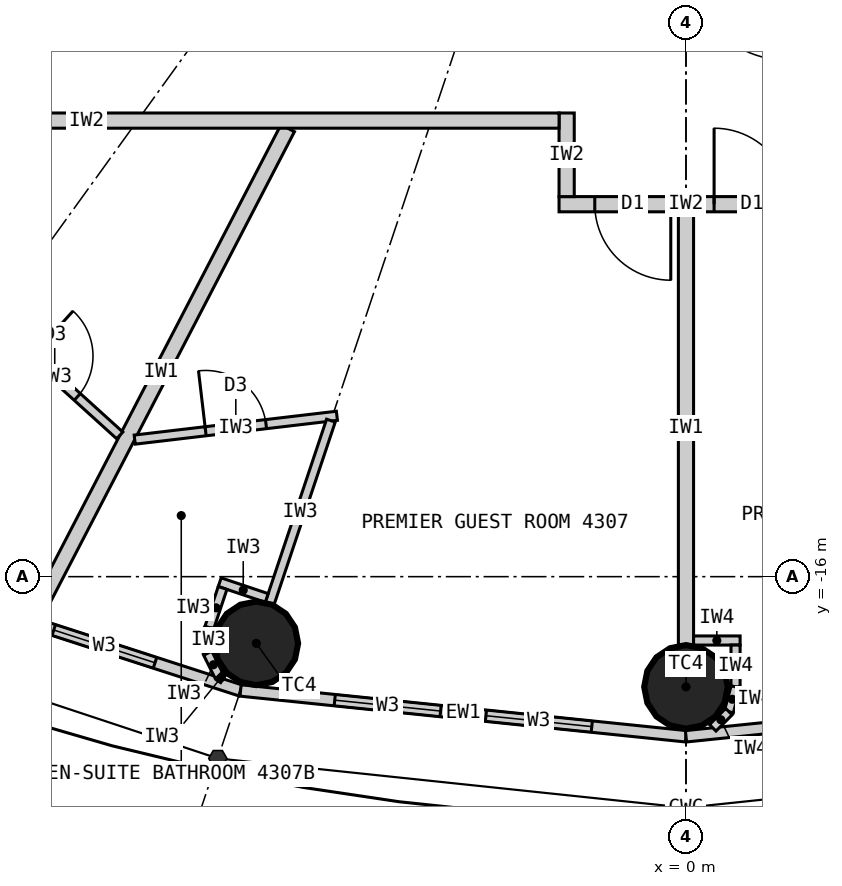
"""IFC4 building model, lengths in metres.
Left out: names, types, materials, properties, quantities, classifications, styles, units other than length and angle.
Written with IfcOpenShell. Run it as: python <this file> out.ifc"""

import sys

from ifc_helpers import new_model, si_unit, direction, frame, frame_2d, origin, origin_2d, place, context, subcontext, project, spatial, rectangle, circle, extrude, element, fill, save


model = new_model("IFC4")
c1 = context("Model", 3, precision=1e-05, world=origin(), true_north=direction((0.0, 1.0)))
c2 = subcontext(c1, "Body", "Model", "MODEL_VIEW")
j1 = project(units=[si_unit("LENGTHUNIT", "METRE"), si_unit("PLANEANGLEUNIT", "RADIAN")], contexts=[c1])
p1 = place(None, origin())
s1 = spatial("IfcSite", under=j1, at=p1, CompositionType="ELEMENT")
p2 = place(p1, origin())
s2 = spatial("IfcBuilding", under=s1, at=p2, CompositionType="ELEMENT")
p3 = place(p2, frame((0.0, 0.0, 163.2)))
s3 = spatial("IfcBuildingStorey", under=s2, at=p3, CompositionType="ELEMENT", Elevation=163.2)
for number, where, z_axis, x_axis in (
    (1, (-5.653, -16.877, 0.0), (0.0, 0.0, 1.0), (1.0, 0.0, 0.0)),
    (2, (0.0, -17.45, 0.0), (0.0, 0.0, 1.0), (1.0, 0.0, 0.0)),
):
    element("IfcColumn", number, at=place(p3, frame(where, z_axis=z_axis, x_axis=x_axis)), inside=s3, PredefinedType="COLUMN", context=c2, shape_type="SweptSolid", body=[
        extrude(circle(Radius=0.55, at=origin_2d()), origin(), (0.0, 0.0, 1.0), 3.3),
    ])
p4 = place(p3, frame((-11.346, -15.722, 0.0), z_axis=(0.0, 0.0, 1.0), x_axis=(0.951432482129, -0.307857486429, 0.0)))
e3 = element("IfcWall", 3, at=p4, inside=s3, PredefinedType="ELEMENTEDWALL", context=c2, shape_type="SweptSolid", body=[
    extrude(rectangle(XDim=5.766, YDim=0.15, at=frame_2d((2.883, 0.0))), origin(), (0.0, 0.0, 1.0), 3.12),
])
p5 = place(p4, frame((1.183, 0.0, 0.9)))
e4 = element("IfcOpeningElement", 4, at=p5, cuts=e3, PredefinedType="OPENING", context=c2, shape_type="SweptSolid", body=[
    extrude(rectangle(XDim=1.4, YDim=1.9, at=frame_2d((0.7, 0.95))), frame((0.0, 0.085, 0.0), z_axis=(0.0, -1.0, 0.0), x_axis=(1.0, 0.0, 0.0)), (0.0, 0.0, 1.0), 0.17),
])
p6 = place(p4, frame((3.183, 0.0, 0.9)))
e5 = element("IfcOpeningElement", 5, at=p6, cuts=e3, PredefinedType="OPENING", context=c2, shape_type="SweptSolid", body=[
    extrude(rectangle(XDim=1.4, YDim=1.9, at=frame_2d((0.7, 0.95))), frame((0.0, 0.085, 0.0), z_axis=(0.0, -1.0, 0.0), x_axis=(1.0, 0.0, 0.0)), (0.0, 0.0, 1.0), 0.17),
])
p7 = place(p3, frame((-5.86, -17.497, 0.0), z_axis=(0.0, 0.0, 1.0), x_axis=(0.994751738032, -0.102318032045, 0.0)))
e6 = element("IfcWall", 6, at=p7, inside=s3, PredefinedType="ELEMENTEDWALL", context=c2, shape_type="SweptSolid", body=[
    extrude(rectangle(XDim=5.891, YDim=0.15, at=frame_2d((2.946, 0.0))), origin(), (0.0, 0.0, 1.0), 3.12),
])
p8 = place(p7, frame((1.246, 0.0, 0.9)))
e7 = element("IfcOpeningElement", 7, at=p8, cuts=e6, PredefinedType="OPENING", context=c2, shape_type="SweptSolid", body=[
    extrude(rectangle(XDim=1.4, YDim=1.9, at=frame_2d((0.7, 0.95))), frame((0.0, 0.085, 0.0), z_axis=(0.0, -1.0, 0.0), x_axis=(1.0, 0.0, 0.0)), (0.0, 0.0, 1.0), 0.17),
])
p9 = place(p7, frame((3.246, 0.0, 0.9)))
e8 = element("IfcOpeningElement", 8, at=p9, cuts=e6, PredefinedType="OPENING", context=c2, shape_type="SweptSolid", body=[
    extrude(rectangle(XDim=1.4, YDim=1.9, at=frame_2d((0.7, 0.95))), frame((0.0, 0.085, 0.0), z_axis=(0.0, -1.0, 0.0), x_axis=(1.0, 0.0, 0.0)), (0.0, 0.0, 1.0), 0.17),
])
p10 = place(p3, frame((0.0, -18.1, 0.0), z_axis=(0.0, 0.0, 1.0), x_axis=(0.994751738032, 0.102318032045, 0.0)))
e9 = element("IfcWall", 9, at=p10, inside=s3, PredefinedType="ELEMENTEDWALL", context=c2, shape_type="SweptSolid", body=[
    extrude(rectangle(XDim=5.891, YDim=0.15, at=frame_2d((2.946, 0.0))), origin(), (0.0, 0.0, 1.0), 3.12),
])
p11 = place(p10, frame((1.246, 0.0, 0.9)))
e10 = element("IfcOpeningElement", 10, at=p11, cuts=e9, PredefinedType="OPENING", context=c2, shape_type="SweptSolid", body=[
    extrude(rectangle(XDim=1.4, YDim=1.9, at=frame_2d((0.7, 0.95))), frame((0.0, 0.085, 0.0), z_axis=(0.0, -1.0, 0.0), x_axis=(1.0, 0.0, 0.0)), (0.0, 0.0, 1.0), 0.17),
])
p12 = place(p10, frame((3.246, 0.0, 0.9)))
e11 = element("IfcOpeningElement", 11, at=p12, cuts=e9, PredefinedType="OPENING", context=c2, shape_type="SweptSolid", body=[
    extrude(rectangle(XDim=1.4, YDim=1.9, at=frame_2d((0.7, 0.95))), frame((0.0, 0.085, 0.0), z_axis=(0.0, -1.0, 0.0), x_axis=(1.0, 0.0, 0.0)), (0.0, 0.0, 1.0), 0.17),
])
p13 = place(p3, frame((-5.24, -10.1, 0.0), z_axis=(0.0, 0.0, 1.0), x_axis=(-0.460532965373, -0.887642601391, 0.0)))
e12 = element("IfcWall", 12, at=p13, inside=s3, PredefinedType="PARTITIONING", context=c2, shape_type="SweptSolid", body=[
    extrude(rectangle(XDim=7.231, YDim=0.2, at=frame_2d((3.616, 0.0))), origin(), (0.0, 0.0, 1.0), 3.12),
])
p14 = place(p3, frame((0.0, -11.2, 0.0), z_axis=(0.0, 0.0, 1.0), x_axis=(0.0, -1.0, 0.0)))
e13 = element("IfcWall", 13, at=p14, inside=s3, PredefinedType="PARTITIONING", context=c2, shape_type="SweptSolid", body=[
    extrude(rectangle(XDim=5.7, YDim=0.2, at=frame_2d((2.85, 0.0))), origin(), (0.0, 0.0, 1.0), 2.42),
])
p15 = place(p3, frame((1.67, -11.1, 0.0), z_axis=(0.0, 0.0, 1.0), x_axis=(-1.0, 0.0, 0.0)))
e14 = element("IfcWall", 14, at=p15, inside=s3, PredefinedType="PARTITIONING", context=c2, shape_type="SweptSolid", body=[
    extrude(rectangle(XDim=3.34, YDim=0.2, at=frame_2d((1.67, 0.0))), origin(), (0.0, 0.0, 1.0), 3.12),
])
p16 = place(p15, frame((1.87, 0.0, 0.0)))
e15 = element("IfcOpeningElement", 15, at=p16, cuts=e14, PredefinedType="OPENING", context=c2, shape_type="SweptSolid", body=[
    extrude(rectangle(XDim=1.0, YDim=2.2, at=frame_2d((0.5, 1.1))), frame((0.0, 0.11, 0.0), z_axis=(0.0, -1.0, 0.0), x_axis=(1.0, 0.0, 0.0)), (0.0, 0.0, 1.0), 0.22),
])
p17 = place(p15, frame((0.3, 0.0, 0.0)))
e16 = element("IfcOpeningElement", 16, at=p17, cuts=e14, PredefinedType="OPENING", context=c2, shape_type="SweptSolid", body=[
    extrude(rectangle(XDim=1.0, YDim=2.2, at=frame_2d((0.5, 1.1))), frame((0.0, 0.11, 0.0), z_axis=(0.0, -1.0, 0.0), x_axis=(1.0, 0.0, 0.0)), (0.0, 0.0, 1.0), 0.22),
])
p18 = place(p3, frame((-1.57, -9.9, 0.0), z_axis=(0.0, 0.0, 1.0), x_axis=(0.0, -1.0, 0.0)))
e17 = element("IfcWall", 17, at=p18, inside=s3, PredefinedType="PARTITIONING", context=c2, shape_type="SweptSolid", body=[
    extrude(rectangle(XDim=1.1, YDim=0.2, at=frame_2d((0.55, 0.0))), origin(), (0.0, 0.0, 1.0), 3.12),
])
p19 = place(p3, frame((-7.45, -14.142, 0.0), z_axis=(0.0, 0.0, 1.0), x_axis=(-0.74113984586, 0.671350675041, 0.0)))
e18 = element("IfcWall", 18, at=p19, inside=s3, PredefinedType="PARTITIONING", context=c2, shape_type="SweptSolid", body=[
    extrude(rectangle(XDim=2.309, YDim=0.12, at=frame_2d((1.154, 0.0))), origin(), (0.0, 0.0, 1.0), 3.12),
])
p20 = place(p19, frame((0.754, 0.0, 0.0)))
e19 = element("IfcOpeningElement", 19, at=p20, cuts=e18, PredefinedType="OPENING", context=c2, shape_type="SweptSolid", body=[
    extrude(rectangle(XDim=0.8, YDim=2.1, at=frame_2d((0.4, 1.05))), frame((0.0, 0.07, 0.0), z_axis=(0.0, -1.0, 0.0), x_axis=(1.0, 0.0, 0.0)), (0.0, 0.0, 1.0), 0.14),
])
p21 = place(p3, frame((-7.253, -14.197, 0.0), z_axis=(0.0, 0.0, 1.0), x_axis=(0.993128188393, 0.117031625725, 0.0)))
e20 = element("IfcWall", 20, at=p21, inside=s3, PredefinedType="PARTITIONING", context=c2, shape_type="SweptSolid", body=[
    extrude(rectangle(XDim=2.678, YDim=0.12, at=frame_2d((1.339, 0.0))), origin(), (0.0, 0.0, 1.0), 3.12),
])
p22 = place(p21, frame((0.939, 0.0, 0.0)))
e21 = element("IfcOpeningElement", 21, at=p22, cuts=e20, PredefinedType="OPENING", context=c2, shape_type="SweptSolid", body=[
    extrude(rectangle(XDim=0.8, YDim=2.1, at=frame_2d((0.4, 1.05))), frame((0.0, 0.07, 0.0), z_axis=(0.0, -1.0, 0.0), x_axis=(1.0, 0.0, 0.0)), (0.0, 0.0, 1.0), 0.14),
])
p23 = place(p3, frame((-4.671, -13.948, 0.0), z_axis=(0.0, 0.0, 1.0), x_axis=(-0.317669167093, -0.948201613729, 0.0)))
e22 = element("IfcWall", 22, at=p23, inside=s3, PredefinedType="PARTITIONING", context=c2, shape_type="SweptSolid", body=[
    extrude(rectangle(XDim=2.54, YDim=0.12, at=frame_2d((1.27, 0.0))), origin(), (0.0, 0.0, 1.0), 2.42),
])
p24 = place(p3, frame((-5.516, -16.28, 0.0), z_axis=(0.0, 0.0, 1.0), x_axis=(-0.948157944392, 0.317799484717, 0.0)))
e23 = element("IfcWall", 23, at=p24, inside=s3, PredefinedType="PARTITIONING", context=c2, shape_type="SweptSolid", body=[
    extrude(rectangle(XDim=0.652, YDim=0.12, at=frame_2d((0.326, 0.0))), origin(), (0.0, 0.0, 1.0), 3.12),
])
p25 = place(p3, frame((-6.097, -16.149, 0.0), z_axis=(0.0, 0.0, 1.0), x_axis=(-0.317292604854, -0.948327687514, 0.0)))
e24 = element("IfcWall", 24, at=p25, inside=s3, PredefinedType="PARTITIONING", context=c2, shape_type="SweptSolid", body=[
    extrude(rectangle(XDim=0.55, YDim=0.12, at=frame_2d((0.275, 0.0))), origin(), (0.0, 0.0, 1.0), 3.12),
])
for number, where, z_axis, x_axis in (
    (25, (-6.271, -16.67, 0.0), (0.0, 0.0, 1.0), (-0.061, -0.998, 0.0)),
    (26, (-6.292, -17.007, 0.0), (0.0, 0.0, 1.0), (0.445, -0.895, 0.0)),
):
    element("IfcWall", number, at=place(p3, frame(where, z_axis=z_axis, x_axis=x_axis)), inside=s3, PredefinedType="PARTITIONING", context=c2, shape_type="SweptSolid", body=[
        extrude(rectangle(XDim=0.338, YDim=0.12, at=frame_2d((0.169, 0.0))), origin(), (0.0, 0.0, 1.0), 3.12),
    ])
p26 = place(p3, frame((-6.142, -17.31, 0.0), z_axis=(0.0, 0.0, 1.0), x_axis=(0.835039693181, -0.550189704386, 0.0)))
e27 = element("IfcWall", 27, at=p26, inside=s3, PredefinedType="PARTITIONING", context=c2, shape_type="SweptSolid", body=[
    extrude(rectangle(XDim=0.062, YDim=0.12, at=frame_2d((0.031, 0.0))), origin(), (0.0, 0.0, 1.0), 3.12),
])
p27 = place(p3, frame((-1.67, -10.0, 0.0), z_axis=(0.0, 0.0, 1.0), x_axis=(-1.0, 0.0, 0.0)))
e28 = element("IfcWall", 28, at=p27, inside=s3, PredefinedType="PARTITIONING", context=c2, shape_type="SweptSolid", body=[
    extrude(rectangle(XDim=12.43, YDim=0.2, at=frame_2d((6.215, 0.0))), origin(), (0.0, 0.0, 1.0), 3.12),
])
p28 = place(p27, frame((9.655, 0.0, 0.0)))
e29 = element("IfcOpeningElement", 29, at=p28, cuts=e28, PredefinedType="OPENING", context=c2, shape_type="SweptSolid", body=[
    extrude(rectangle(XDim=1.0, YDim=2.2, at=frame_2d((0.5, 1.1))), frame((0.0, 0.11, 0.0), z_axis=(0.0, -1.0, 0.0), x_axis=(1.0, 0.0, 0.0)), (0.0, 0.0, 1.0), 0.22),
])
p29 = place(p3, frame((0.1, -16.84, 0.0), z_axis=(0.0, 0.0, 1.0), x_axis=(1.0, 0.0, 0.0)))
e30 = element("IfcWall", 30, at=p29, inside=s3, PredefinedType="PARTITIONING", context=c2, shape_type="SweptSolid", body=[
    extrude(rectangle(XDim=0.612, YDim=0.12, at=frame_2d((0.306, 0.0))), origin(), (0.0, 0.0, 1.0), 3.12),
])
p30 = place(p3, frame((0.652, -16.9, 0.0), z_axis=(0.0, 0.0, 1.0), x_axis=(0.0, -1.0, 0.0)))
e31 = element("IfcWall", 31, at=p30, inside=s3, PredefinedType="PARTITIONING", context=c2, shape_type="SweptSolid", body=[
    extrude(rectangle(XDim=0.55, YDim=0.12, at=frame_2d((0.275, 0.0))), origin(), (0.0, 0.0, 1.0), 3.12),
])
p31 = place(p3, frame((0.652, -17.45, 0.0), z_axis=(0.0, 0.0, 1.0), x_axis=(-0.258832454679, -0.965922233104, 0.0)))
e32 = element("IfcWall", 32, at=p31, inside=s3, PredefinedType="PARTITIONING", context=c2, shape_type="SweptSolid", body=[
    extrude(rectangle(XDim=0.338, YDim=0.12, at=frame_2d((0.169, 0.0))), origin(), (0.0, 0.0, 1.0), 3.12),
])
p32 = place(p3, frame((0.565, -17.776, 0.0), z_axis=(0.0, 0.0, 1.0), x_axis=(-0.707106781187, -0.707106781187, 0.0)))
e33 = element("IfcWall", 33, at=p32, inside=s3, PredefinedType="PARTITIONING", context=c2, shape_type="SweptSolid", body=[
    extrude(rectangle(XDim=0.301, YDim=0.12, at=frame_2d((0.15, 0.0))), origin(), (0.0, 0.0, 1.0), 3.12),
])
p33 = place(p6, origin())
e34 = element("IfcWindow", 34, at=p33, inside=s3, PartitioningType="SINGLE_PANEL", PredefinedType="WINDOW", context=c2, shape_type="SweptSolid", body=[
    extrude(rectangle(XDim=1.4, YDim=1.9, at=frame_2d((0.7, 0.95))), frame((0.0, 0.03, 0.0), z_axis=(0.0, -1.0, 0.0), x_axis=(1.0, 0.0, 0.0)), (0.0, 0.0, 1.0), 0.06),
])
fill(e5, e34)
p34 = place(p8, origin())
e35 = element("IfcWindow", 35, at=p34, inside=s3, PartitioningType="SINGLE_PANEL", PredefinedType="WINDOW", context=c2, shape_type="SweptSolid", body=[
    extrude(rectangle(XDim=1.4, YDim=1.9, at=frame_2d((0.7, 0.95))), frame((0.0, 0.03, 0.0), z_axis=(0.0, -1.0, 0.0), x_axis=(1.0, 0.0, 0.0)), (0.0, 0.0, 1.0), 0.06),
])
fill(e7, e35)
p35 = place(p9, origin())
e36 = element("IfcWindow", 36, at=p35, inside=s3, PartitioningType="SINGLE_PANEL", PredefinedType="WINDOW", context=c2, shape_type="SweptSolid", body=[
    extrude(rectangle(XDim=1.4, YDim=1.9, at=frame_2d((0.7, 0.95))), frame((0.0, 0.03, 0.0), z_axis=(0.0, -1.0, 0.0), x_axis=(1.0, 0.0, 0.0)), (0.0, 0.0, 1.0), 0.06),
])
fill(e8, e36)
p36 = place(p20, origin())
e37 = element("IfcDoor", 37, at=p36, inside=s3, OperationType="SINGLE_SWING_RIGHT", PredefinedType="DOOR", context=c2, shape_type="SweptSolid", body=[
    extrude(rectangle(XDim=0.8, YDim=2.1, at=frame_2d((0.4, 1.05))), frame((0.0, 0.025, 0.0), z_axis=(0.0, -1.0, 0.0), x_axis=(1.0, 0.0, 0.0)), (0.0, 0.0, 1.0), 0.05),
])
fill(e19, e37)
p37 = place(p22, origin())
e38 = element("IfcDoor", 38, at=p37, inside=s3, OperationType="SINGLE_SWING_LEFT", PredefinedType="DOOR", context=c2, shape_type="SweptSolid", body=[
    extrude(rectangle(XDim=0.8, YDim=2.1, at=frame_2d((0.4, 1.05))), frame((0.0, 0.025, 0.0), z_axis=(0.0, -1.0, 0.0), x_axis=(1.0, 0.0, 0.0)), (0.0, 0.0, 1.0), 0.05),
])
fill(e21, e38)
p38 = place(p16, origin())
e39 = element("IfcDoor", 39, at=p38, inside=s3, OperationType="SINGLE_SWING_LEFT", PredefinedType="DOOR", context=c2, shape_type="SweptSolid", body=[
    extrude(rectangle(XDim=1.0, YDim=2.2, at=frame_2d((0.5, 1.1))), frame((0.0, 0.025, 0.0), z_axis=(0.0, -1.0, 0.0), x_axis=(1.0, 0.0, 0.0)), (0.0, 0.0, 1.0), 0.05),
])
fill(e15, e39)
p39 = place(p17, origin())
e40 = element("IfcDoor", 40, at=p39, inside=s3, OperationType="SINGLE_SWING_RIGHT", PredefinedType="DOOR", context=c2, shape_type="SweptSolid", body=[
    extrude(rectangle(XDim=1.0, YDim=2.2, at=frame_2d((0.5, 1.1))), frame((0.0, 0.025, 0.0), z_axis=(0.0, -1.0, 0.0), x_axis=(1.0, 0.0, 0.0)), (0.0, 0.0, 1.0), 0.05),
])
fill(e16, e40)
save(model, sys.argv[1])
